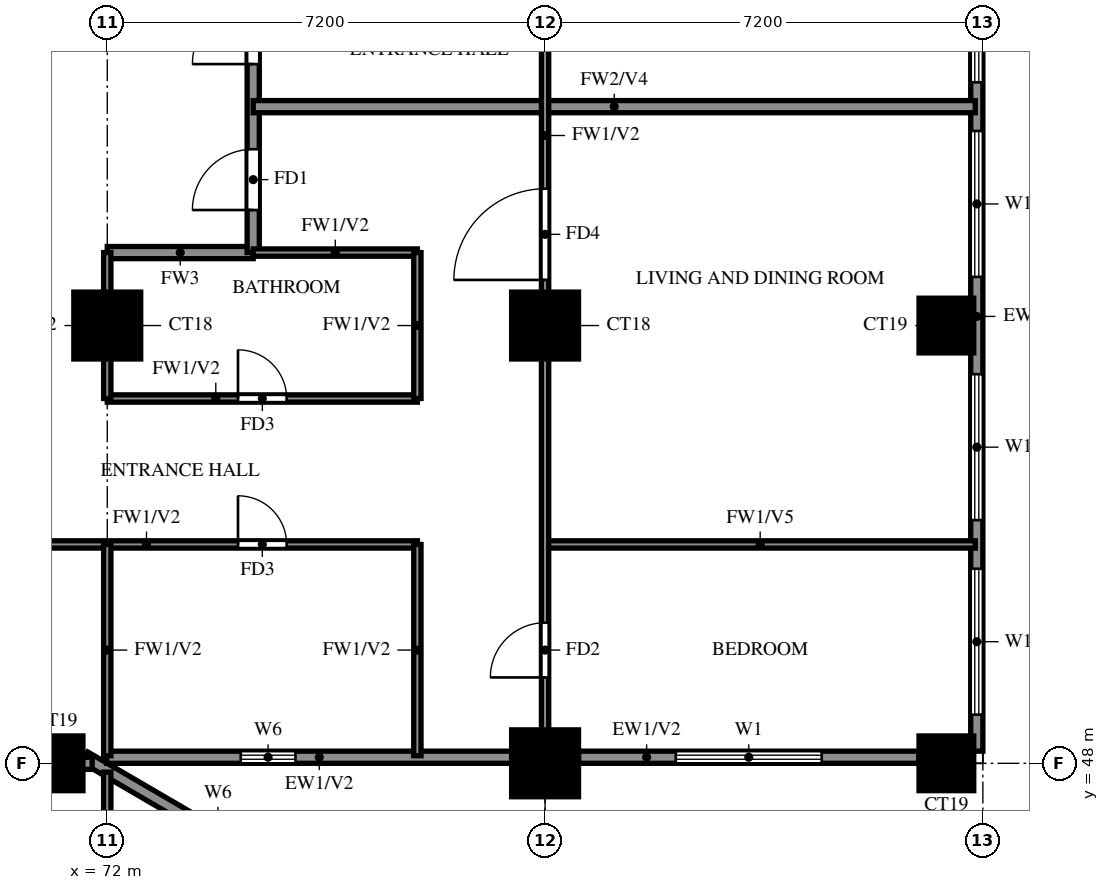
"""IFC4 building model, lengths in metres.
Left out: names, types, materials, properties, quantities, classifications, styles, units other than length and angle.
Written with IfcOpenShell. Run it as: python <this file> out.ifc"""

import sys

from ifc_helpers import new_model, si_unit, direction, frame, frame_2d, origin, origin_2d, place, context, subcontext, project, spatial, rectangle, extrude, source, transform, mapped, element, fill, save


model = new_model("IFC4")
c1 = context("Model", 3, precision=1e-05, world=origin(), true_north=direction((0.0, 1.0)))
c2 = subcontext(c1, "Body", "Model", "MODEL_VIEW")
j1 = project(units=[si_unit("LENGTHUNIT", "METRE"), si_unit("PLANEANGLEUNIT", "RADIAN")], contexts=[c1])
p1 = place(None, origin())
s1 = spatial("IfcSite", under=j1, at=p1, CompositionType="ELEMENT")
p2 = place(p1, origin())
s2 = spatial("IfcBuilding", under=s1, at=p2, CompositionType="ELEMENT")
p3 = place(p2, frame((0.0, 0.0, 113.0)))
s3 = spatial("IfcBuildingStorey", under=s2, at=p3, CompositionType="ELEMENT", Elevation=113.0)
m1 = source(origin(), c2, "Body", "SweptSolid", [
    extrude(rectangle(XDim=0.9, YDim=0.9, at=origin_2d()), origin(), (0.0, 0.0, 1.0), 3.2),
])
p4 = place(p3, frame((71.15, 48.0, 0.0), z_axis=(0.0, 0.0, 1.0), x_axis=(1.0, 0.0, 0.0)))
e1 = element("IfcColumn", 1, at=p4, inside=s3, PredefinedType="COLUMN", context=c2, shape_type="MappedRepresentation", body=[
    mapped(m1, transform((0.0, 0.0, 0.0))),
])
m2 = source(origin(), c2, "Body", "SweptSolid", [
    extrude(rectangle(XDim=1.1, YDim=1.1, at=origin_2d()), origin(), (0.0, 0.0, 1.0), 3.2),
])
p5 = place(p3, frame((79.2, 48.0, 0.0), z_axis=(0.0, 0.0, 1.0), x_axis=(1.0, 0.0, 0.0)))
e2 = element("IfcColumn", 2, at=p5, inside=s3, PredefinedType="COLUMN", context=c2, shape_type="MappedRepresentation", body=[
    mapped(m2, transform((0.0, 0.0, 0.0))),
])
p6 = place(p3, frame((85.8, 48.0, 0.0), z_axis=(0.0, 0.0, 1.0), x_axis=(1.0, 0.0, 0.0)))
e3 = element("IfcColumn", 3, at=p6, inside=s3, PredefinedType="COLUMN", context=c2, shape_type="MappedRepresentation", body=[
    mapped(m1, transform((0.0, 0.0, 0.0))),
])
for number, where, z_axis, x_axis in (
    (4, (72.0, 55.2, 0.0), (0.0, 0.0, 1.0), (1.0, 0.0, 0.0)),
    (5, (79.2, 55.2, 0.0), (0.0, 0.0, 1.0), (1.0, 0.0, 0.0)),
):
    element("IfcColumn", number, at=place(p3, frame(where, z_axis=z_axis, x_axis=x_axis)), inside=s3, PredefinedType="COLUMN", context=c2, shape_type="MappedRepresentation", body=[
        mapped(m2, transform((0.0, 0.0, 0.0))),
    ])
p7 = place(p3, frame((85.8, 55.2, 0.0), z_axis=(0.0, 0.0, 1.0), x_axis=(1.0, 0.0, 0.0)))
e6 = element("IfcColumn", 6, at=p7, inside=s3, PredefinedType="COLUMN", context=c2, shape_type="MappedRepresentation", body=[
    mapped(m1, transform((0.0, 0.0, 0.0))),
])
p8 = place(p3, frame((85.719, 39.881, 0.0), z_axis=(0.0, 0.0, 1.0), x_axis=(-0.86377618652, 0.503875678716, 0.0)))
e7 = element("IfcWall", 7, at=p8, inside=s3, PredefinedType="SOLIDWALL", context=c2, shape_type="SweptSolid", body=[
    extrude(rectangle(XDim=16.311, YDim=0.2, at=frame_2d((8.156, 0.0))), origin(), (0.0, 0.0, 1.0), 3.2),
])
p9 = place(p8, frame((13.326, 0.0, 1.5)))
e8 = element("IfcOpeningElement", 8, at=p9, cuts=e7, PredefinedType="OPENING", context=c2, shape_type="SweptSolid", body=[
    extrude(rectangle(XDim=0.9, YDim=0.9, at=frame_2d((0.45, 0.45))), frame((0.0, 0.11, 0.0), z_axis=(0.0, -1.0, 0.0), x_axis=(1.0, 0.0, 0.0)), (0.0, 0.0, 1.0), 0.22),
])
p10 = place(p3, frame((71.99, 48.1, 0.0), z_axis=(0.0, 0.0, 1.0), x_axis=(1.0, 0.0, 0.0)))
e9 = element("IfcWall", 9, at=p10, inside=s3, PredefinedType="SOLIDWALL", context=c2, shape_type="SweptSolid", body=[
    extrude(rectangle(XDim=6.66, YDim=0.2, at=frame_2d((3.33, 0.0))), origin(), (0.0, 0.0, 1.0), 3.2),
])
p11 = place(p10, frame((2.205, 0.0, 1.5)))
e10 = element("IfcOpeningElement", 10, at=p11, cuts=e9, PredefinedType="OPENING", context=c2, shape_type="SweptSolid", body=[
    extrude(rectangle(XDim=0.9, YDim=0.9, at=frame_2d((0.45, 0.45))), frame((0.0, 0.11, 0.0), z_axis=(0.0, -1.0, 0.0), x_axis=(1.0, 0.0, 0.0)), (0.0, 0.0, 1.0), 0.22),
])
p12 = place(p3, frame((79.75, 48.1, 0.0), z_axis=(0.0, 0.0, 1.0), x_axis=(1.0, 0.0, 0.0)))
e11 = element("IfcWall", 11, at=p12, inside=s3, PredefinedType="SOLIDWALL", context=c2, shape_type="SweptSolid", body=[
    extrude(rectangle(XDim=5.6, YDim=0.2, at=frame_2d((2.8, 0.0))), origin(), (0.0, 0.0, 1.0), 3.2),
])
p13 = place(p12, frame((1.6, 0.0, 0.6)))
e12 = element("IfcOpeningElement", 12, at=p13, cuts=e11, PredefinedType="OPENING", context=c2, shape_type="SweptSolid", body=[
    extrude(rectangle(XDim=2.4, YDim=2.4, at=frame_2d((1.2, 1.2))), frame((0.0, 0.11, 0.0), z_axis=(0.0, -1.0, 0.0), x_axis=(1.0, 0.0, 0.0)), (0.0, 0.0, 1.0), 0.22),
])
p14 = place(p3, frame((86.3, 48.2, 0.0), z_axis=(0.0, 0.0, 1.0), x_axis=(0.0, 1.0, 0.0)))
e13 = element("IfcWall", 13, at=p14, inside=s3, PredefinedType="SOLIDWALL", context=c2, shape_type="SweptSolid", body=[
    extrude(rectangle(XDim=28.6, YDim=0.2, at=frame_2d((14.3, 0.0))), origin(), (0.0, 0.0, 1.0), 3.2),
])
p15 = place(p14, frame((0.6, 0.0, 0.6)))
e14 = element("IfcOpeningElement", 14, at=p15, cuts=e13, PredefinedType="OPENING", context=c2, shape_type="SweptSolid", body=[
    extrude(rectangle(XDim=2.4, YDim=2.4, at=frame_2d((1.2, 1.2))), frame((0.0, 0.11, 0.0), z_axis=(0.0, -1.0, 0.0), x_axis=(1.0, 0.0, 0.0)), (0.0, 0.0, 1.0), 0.22),
])
p16 = place(p14, frame((3.8, 0.0, 0.6)))
e15 = element("IfcOpeningElement", 15, at=p16, cuts=e13, PredefinedType="OPENING", context=c2, shape_type="SweptSolid", body=[
    extrude(rectangle(XDim=2.4, YDim=2.4, at=frame_2d((1.2, 1.2))), frame((0.0, 0.11, 0.0), z_axis=(0.0, -1.0, 0.0), x_axis=(1.0, 0.0, 0.0)), (0.0, 0.0, 1.0), 0.22),
])
p17 = place(p14, frame((7.8, 0.0, 0.6)))
e16 = element("IfcOpeningElement", 16, at=p17, cuts=e13, PredefinedType="OPENING", context=c2, shape_type="SweptSolid", body=[
    extrude(rectangle(XDim=2.4, YDim=2.4, at=frame_2d((1.2, 1.2))), frame((0.0, 0.11, 0.0), z_axis=(0.0, -1.0, 0.0), x_axis=(1.0, 0.0, 0.0)), (0.0, 0.0, 1.0), 0.22),
])
p18 = place(p14, frame((11.0, 0.0, 0.6)))
e17 = element("IfcOpeningElement", 17, at=p18, cuts=e13, PredefinedType="OPENING", context=c2, shape_type="SweptSolid", body=[
    extrude(rectangle(XDim=2.4, YDim=2.4, at=frame_2d((1.2, 1.2))), frame((0.0, 0.11, 0.0), z_axis=(0.0, -1.0, 0.0), x_axis=(1.0, 0.0, 0.0)), (0.0, 0.0, 1.0), 0.22),
])
p19 = place(p14, frame((15.167, 0.0, 0.6)))
e18 = element("IfcOpeningElement", 18, at=p19, cuts=e13, PredefinedType="OPENING", context=c2, shape_type="SweptSolid", body=[
    extrude(rectangle(XDim=2.4, YDim=2.4, at=frame_2d((1.2, 1.2))), frame((0.0, 0.11, 0.0), z_axis=(0.0, -1.0, 0.0), x_axis=(1.0, 0.0, 0.0)), (0.0, 0.0, 1.0), 0.22),
])
p20 = place(p14, frame((18.033, 0.0, 0.6)))
e19 = element("IfcOpeningElement", 19, at=p20, cuts=e13, PredefinedType="OPENING", context=c2, shape_type="SweptSolid", body=[
    extrude(rectangle(XDim=2.4, YDim=2.4, at=frame_2d((1.2, 1.2))), frame((0.0, 0.11, 0.0), z_axis=(0.0, -1.0, 0.0), x_axis=(1.0, 0.0, 0.0)), (0.0, 0.0, 1.0), 0.22),
])
p21 = place(p14, frame((22.95, 0.0, 1.5)))
e20 = element("IfcOpeningElement", 20, at=p21, cuts=e13, PredefinedType="OPENING", context=c2, shape_type="SweptSolid", body=[
    extrude(rectangle(XDim=0.9, YDim=0.9, at=frame_2d((0.45, 0.45))), frame((0.0, 0.11, 0.0), z_axis=(0.0, -1.0, 0.0), x_axis=(1.0, 0.0, 0.0)), (0.0, 0.0, 1.0), 0.22),
])
p22 = place(p14, frame((25.4, 0.0, 0.6)))
e21 = element("IfcOpeningElement", 21, at=p22, cuts=e13, PredefinedType="OPENING", context=c2, shape_type="SweptSolid", body=[
    extrude(rectangle(XDim=2.4, YDim=2.4, at=frame_2d((1.2, 1.2))), frame((0.0, 0.11, 0.0), z_axis=(0.0, -1.0, 0.0), x_axis=(1.0, 0.0, 0.0)), (0.0, 0.0, 1.0), 0.22),
])
p23 = place(p3, frame((72.0, 56.4, 0.0), z_axis=(0.0, 0.0, 1.0), x_axis=(1.0, 0.0, 0.0)))
e22 = element("IfcWall", 22, at=p23, inside=s3, PredefinedType="SOLIDWALL", context=c2, shape_type="SweptSolid", body=[
    extrude(rectangle(XDim=2.4, YDim=0.2, at=frame_2d((1.2, 0.0))), origin(), (0.0, 0.0, 1.0), 3.2),
])
p24 = place(p3, frame((74.4, 56.4, 0.0), z_axis=(0.0, 0.0, 1.0), x_axis=(0.0, 1.0, 0.0)))
e23 = element("IfcWall", 23, at=p24, inside=s3, PredefinedType="SOLIDWALL", context=c2, shape_type="SweptSolid", body=[
    extrude(rectangle(XDim=9.6, YDim=0.2, at=frame_2d((4.8, 0.0))), origin(), (0.0, 0.0, 1.0), 3.2),
])
p25 = place(p24, frame((0.7, 0.0, 0.0)))
e24 = element("IfcOpeningElement", 24, at=p25, cuts=e23, PredefinedType="OPENING", context=c2, shape_type="SweptSolid", body=[
    extrude(rectangle(XDim=1.0, YDim=2.1, at=frame_2d((0.5, 1.05))), frame((0.0, 0.11, 0.0), z_axis=(0.0, -1.0, 0.0), x_axis=(1.0, 0.0, 0.0)), (0.0, 0.0, 1.0), 0.22),
])
p26 = place(p24, frame((3.1, 0.0, 0.0)))
e25 = element("IfcOpeningElement", 25, at=p26, cuts=e23, PredefinedType="OPENING", context=c2, shape_type="SweptSolid", body=[
    extrude(rectangle(XDim=1.0, YDim=2.1, at=frame_2d((0.5, 1.05))), frame((0.0, 0.11, 0.0), z_axis=(0.0, -1.0, 0.0), x_axis=(1.0, 0.0, 0.0)), (0.0, 0.0, 1.0), 0.22),
])
p27 = place(p3, frame((67.2, 48.0, 0.0), z_axis=(0.0, 0.0, 1.0), x_axis=(1.0, 0.0, 0.0)))
e26 = element("IfcWall", 26, at=p27, inside=s3, PredefinedType="SOLIDWALL", context=c2, shape_type="SweptSolid", body=[
    extrude(rectangle(XDim=4.552, YDim=0.2, at=frame_2d((2.276, 0.0))), origin(), (0.0, 0.0, 1.0), 3.2),
])
p28 = place(p3, frame((74.4, 58.8, 0.0), z_axis=(0.0, 0.0, 1.0), x_axis=(1.0, 0.0, 0.0)))
e27 = element("IfcWall", 27, at=p28, inside=s3, PredefinedType="SOLIDWALL", context=c2, shape_type="SweptSolid", body=[
    extrude(rectangle(XDim=11.875, YDim=0.2, at=frame_2d((5.938, 0.0))), origin(), (0.0, 0.0, 1.0), 2.3),
])
p29 = place(p3, frame((67.2, 51.6, 0.0), z_axis=(0.0, 0.0, 1.0), x_axis=(1.0, 0.0, 0.0)))
e28 = element("IfcWall", 28, at=p29, inside=s3, PredefinedType="PARTITIONING", context=c2, shape_type="SweptSolid", body=[
    extrude(rectangle(XDim=9.9, YDim=0.12, at=frame_2d((4.95, 0.0))), origin(), (0.0, 0.0, 1.0), 3.2),
])
p30 = place(p29, frame((6.95, 0.0, 0.0)))
e29 = element("IfcOpeningElement", 29, at=p30, cuts=e28, PredefinedType="OPENING", context=c2, shape_type="SweptSolid", body=[
    extrude(rectangle(XDim=0.8, YDim=2.1, at=frame_2d((0.4, 1.05))), frame((0.0, 0.07, 0.0), z_axis=(0.0, -1.0, 0.0), x_axis=(1.0, 0.0, 0.0)), (0.0, 0.0, 1.0), 0.14),
])
p31 = place(p29, frame((1.95, 0.0, 0.0)))
e30 = element("IfcOpeningElement", 30, at=p31, cuts=e28, PredefinedType="OPENING", context=c2, shape_type="SweptSolid", body=[
    extrude(rectangle(XDim=0.9, YDim=2.1, at=frame_2d((0.45, 1.05))), frame((0.0, 0.07, 0.0), z_axis=(0.0, -1.0, 0.0), x_axis=(1.0, 0.0, 0.0)), (0.0, 0.0, 1.0), 0.14),
])
p32 = place(p3, frame((79.2, 51.6, 0.0), z_axis=(0.0, 0.0, 1.0), x_axis=(1.0, 0.0, 0.0)))
e31 = element("IfcWall", 31, at=p32, inside=s3, PredefinedType="PARTITIONING", context=c2, shape_type="SweptSolid", body=[
    extrude(rectangle(XDim=7.075, YDim=0.12, at=frame_2d((3.538, 0.0))), origin(), (0.0, 0.0, 1.0), 2.3),
])
p33 = place(p3, frame((72.0, 54.0, 0.0), z_axis=(0.0, 0.0, 1.0), x_axis=(1.0, 0.0, 0.0)))
e32 = element("IfcWall", 32, at=p33, inside=s3, PredefinedType="PARTITIONING", context=c2, shape_type="SweptSolid", body=[
    extrude(rectangle(XDim=5.1, YDim=0.12, at=frame_2d((2.55, 0.0))), origin(), (0.0, 0.0, 1.0), 3.2),
])
p34 = place(p33, frame((2.15, 0.0, 0.0)))
e33 = element("IfcOpeningElement", 33, at=p34, cuts=e32, PredefinedType="OPENING", context=c2, shape_type="SweptSolid", body=[
    extrude(rectangle(XDim=0.8, YDim=2.1, at=frame_2d((0.4, 1.05))), frame((0.0, 0.07, 0.0), z_axis=(0.0, -1.0, 0.0), x_axis=(1.0, 0.0, 0.0)), (0.0, 0.0, 1.0), 0.14),
])
p35 = place(p3, frame((74.4, 56.4, 0.0), z_axis=(0.0, 0.0, 1.0), x_axis=(1.0, 0.0, 0.0)))
e34 = element("IfcWall", 34, at=p35, inside=s3, PredefinedType="PARTITIONING", context=c2, shape_type="SweptSolid", body=[
    extrude(rectangle(XDim=2.7, YDim=0.12, at=frame_2d((1.35, 0.0))), origin(), (0.0, 0.0, 1.0), 3.2),
])
p36 = place(p3, frame((72.0, 39.725, 0.0), z_axis=(0.0, 0.0, 1.0), x_axis=(0.0, 1.0, 0.0)))
e35 = element("IfcWall", 35, at=p36, inside=s3, PredefinedType="PARTITIONING", context=c2, shape_type="SweptSolid", body=[
    extrude(rectangle(XDim=8.13, YDim=0.12, at=frame_2d((4.065, 0.0))), origin(), (0.0, 0.0, 1.0), 2.3),
])
p37 = place(p36, frame((1.788, 0.0, 0.0)))
e36 = element("IfcOpeningElement", 36, at=p37, cuts=e35, PredefinedType="OPENING", context=c2, shape_type="SweptSolid", body=[
    extrude(rectangle(XDim=0.9, YDim=2.1, at=frame_2d((0.45, 1.05))), frame((0.0, 0.07, 0.0), z_axis=(0.0, -1.0, 0.0), x_axis=(1.0, 0.0, 0.0)), (0.0, 0.0, 1.0), 0.14),
])
p38 = place(p36, frame((4.575, 0.0, 0.0)))
e37 = element("IfcOpeningElement", 37, at=p38, cuts=e35, PredefinedType="OPENING", context=c2, shape_type="SweptSolid", body=[
    extrude(rectangle(XDim=0.8, YDim=2.1, at=frame_2d((0.4, 1.05))), frame((0.0, 0.07, 0.0), z_axis=(0.0, -1.0, 0.0), x_axis=(1.0, 0.0, 0.0)), (0.0, 0.0, 1.0), 0.14),
])
p39 = place(p3, frame((72.0, 48.125, 0.0), z_axis=(0.0, 0.0, 1.0), x_axis=(0.0, 1.0, 0.0)))
e38 = element("IfcWall", 38, at=p39, inside=s3, PredefinedType="PARTITIONING", context=c2, shape_type="SweptSolid", body=[
    extrude(rectangle(XDim=3.475, YDim=0.12, at=frame_2d((1.738, 0.0))), origin(), (0.0, 0.0, 1.0), 3.2),
])
p40 = place(p3, frame((72.0, 54.0, 0.0), z_axis=(0.0, 0.0, 1.0), x_axis=(0.0, 1.0, 0.0)))
e39 = element("IfcWall", 39, at=p40, inside=s3, PredefinedType="PARTITIONING", context=c2, shape_type="SweptSolid", body=[
    extrude(rectangle(XDim=2.4, YDim=0.12, at=frame_2d((1.2, 0.0))), origin(), (0.0, 0.0, 1.0), 3.2),
])
p41 = place(p3, frame((77.1, 48.125, 0.0), z_axis=(0.0, 0.0, 1.0), x_axis=(0.0, 1.0, 0.0)))
e40 = element("IfcWall", 40, at=p41, inside=s3, PredefinedType="PARTITIONING", context=c2, shape_type="SweptSolid", body=[
    extrude(rectangle(XDim=3.475, YDim=0.12, at=frame_2d((1.738, 0.0))), origin(), (0.0, 0.0, 1.0), 3.2),
])
p42 = place(p3, frame((77.1, 54.0, 0.0), z_axis=(0.0, 0.0, 1.0), x_axis=(0.0, 1.0, 0.0)))
e41 = element("IfcWall", 41, at=p42, inside=s3, PredefinedType="PARTITIONING", context=c2, shape_type="SweptSolid", body=[
    extrude(rectangle(XDim=2.4, YDim=0.12, at=frame_2d((1.2, 0.0))), origin(), (0.0, 0.0, 1.0), 3.2),
])
p43 = place(p3, frame((79.2, 48.125, 0.0), z_axis=(0.0, 0.0, 1.0), x_axis=(0.0, 1.0, 0.0)))
e42 = element("IfcWall", 42, at=p43, inside=s3, PredefinedType="PARTITIONING", context=c2, shape_type="SweptSolid", body=[
    extrude(rectangle(XDim=21.475, YDim=0.12, at=frame_2d((10.738, 0.0))), origin(), (0.0, 0.0, 1.0), 3.2),
])
p44 = place(p43, frame((1.288, 0.0, 0.0)))
e43 = element("IfcOpeningElement", 43, at=p44, cuts=e42, PredefinedType="OPENING", context=c2, shape_type="SweptSolid", body=[
    extrude(rectangle(XDim=0.9, YDim=2.1, at=frame_2d((0.45, 1.05))), frame((0.0, 0.07, 0.0), z_axis=(0.0, -1.0, 0.0), x_axis=(1.0, 0.0, 0.0)), (0.0, 0.0, 1.0), 0.14),
])
p45 = place(p43, frame((7.825, 0.0, 0.0)))
e44 = element("IfcOpeningElement", 44, at=p45, cuts=e42, PredefinedType="OPENING", context=c2, shape_type="SweptSolid", body=[
    extrude(rectangle(XDim=1.5, YDim=2.1, at=frame_2d((0.75, 1.05))), frame((0.0, 0.07, 0.0), z_axis=(0.0, -1.0, 0.0), x_axis=(1.0, 0.0, 0.0)), (0.0, 0.0, 1.0), 0.14),
])
p46 = place(p43, frame((12.025, 0.0, 0.0)))
e45 = element("IfcOpeningElement", 45, at=p46, cuts=e42, PredefinedType="OPENING", context=c2, shape_type="SweptSolid", body=[
    extrude(rectangle(XDim=0.9, YDim=2.1, at=frame_2d((0.45, 1.05))), frame((0.0, 0.07, 0.0), z_axis=(0.0, -1.0, 0.0), x_axis=(1.0, 0.0, 0.0)), (0.0, 0.0, 1.0), 0.14),
])
p47 = place(p43, frame((17.425, 0.0, 0.0)))
e46 = element("IfcOpeningElement", 46, at=p47, cuts=e42, PredefinedType="OPENING", context=c2, shape_type="SweptSolid", body=[
    extrude(rectangle(XDim=0.9, YDim=2.1, at=frame_2d((0.45, 1.05))), frame((0.0, 0.07, 0.0), z_axis=(0.0, -1.0, 0.0), x_axis=(1.0, 0.0, 0.0)), (0.0, 0.0, 1.0), 0.14),
])
p48 = place(p11, origin())
e47 = element("IfcWindow", 47, at=p48, inside=s3, PartitioningType="SINGLE_PANEL", PredefinedType="WINDOW", context=c2, shape_type="SweptSolid", body=[
    extrude(rectangle(XDim=0.9, YDim=0.9, at=frame_2d((0.45, 0.45))), frame((0.0, 0.03, 0.0), z_axis=(0.0, -1.0, 0.0), x_axis=(1.0, 0.0, 0.0)), (0.0, 0.0, 1.0), 0.06),
])
fill(e10, e47)
p49 = place(p13, origin())
e48 = element("IfcWindow", 48, at=p49, inside=s3, PartitioningType="DOUBLE_PANEL_VERTICAL", PredefinedType="WINDOW", context=c2, shape_type="SweptSolid", body=[
    extrude(rectangle(XDim=2.4, YDim=2.4, at=frame_2d((1.2, 1.2))), frame((0.0, 0.03, 0.0), z_axis=(0.0, -1.0, 0.0), x_axis=(1.0, 0.0, 0.0)), (0.0, 0.0, 1.0), 0.06),
])
fill(e12, e48)
p50 = place(p15, origin())
e49 = element("IfcWindow", 49, at=p50, inside=s3, PartitioningType="DOUBLE_PANEL_VERTICAL", PredefinedType="WINDOW", context=c2, shape_type="SweptSolid", body=[
    extrude(rectangle(XDim=2.4, YDim=2.4, at=frame_2d((1.2, 1.2))), frame((0.0, 0.03, 0.0), z_axis=(0.0, -1.0, 0.0), x_axis=(1.0, 0.0, 0.0)), (0.0, 0.0, 1.0), 0.06),
])
fill(e14, e49)
p51 = place(p16, origin())
e50 = element("IfcWindow", 50, at=p51, inside=s3, PartitioningType="DOUBLE_PANEL_VERTICAL", PredefinedType="WINDOW", context=c2, shape_type="SweptSolid", body=[
    extrude(rectangle(XDim=2.4, YDim=2.4, at=frame_2d((1.2, 1.2))), frame((0.0, 0.03, 0.0), z_axis=(0.0, -1.0, 0.0), x_axis=(1.0, 0.0, 0.0)), (0.0, 0.0, 1.0), 0.06),
])
fill(e15, e50)
p52 = place(p17, origin())
e51 = element("IfcWindow", 51, at=p52, inside=s3, PartitioningType="DOUBLE_PANEL_VERTICAL", PredefinedType="WINDOW", context=c2, shape_type="SweptSolid", body=[
    extrude(rectangle(XDim=2.4, YDim=2.4, at=frame_2d((1.2, 1.2))), frame((0.0, 0.03, 0.0), z_axis=(0.0, -1.0, 0.0), x_axis=(1.0, 0.0, 0.0)), (0.0, 0.0, 1.0), 0.06),
])
fill(e16, e51)
p53 = place(p18, origin())
e52 = element("IfcWindow", 52, at=p53, inside=s3, PartitioningType="DOUBLE_PANEL_VERTICAL", PredefinedType="WINDOW", context=c2, shape_type="SweptSolid", body=[
    extrude(rectangle(XDim=2.4, YDim=2.4, at=frame_2d((1.2, 1.2))), frame((0.0, 0.03, 0.0), z_axis=(0.0, -1.0, 0.0), x_axis=(1.0, 0.0, 0.0)), (0.0, 0.0, 1.0), 0.06),
])
fill(e17, e52)
p54 = place(p25, origin())
e53 = element("IfcDoor", 53, at=p54, inside=s3, OperationType="SINGLE_SWING_LEFT", PredefinedType="DOOR", context=c2, shape_type="SweptSolid", body=[
    extrude(rectangle(XDim=1.0, YDim=2.1, at=frame_2d((0.5, 1.05))), frame((0.0, 0.025, 0.0), z_axis=(0.0, -1.0, 0.0), x_axis=(1.0, 0.0, 0.0)), (0.0, 0.0, 1.0), 0.05),
])
fill(e24, e53)
p55 = place(p44, origin())
e54 = element("IfcDoor", 54, at=p55, inside=s3, OperationType="SINGLE_SWING_RIGHT", PredefinedType="DOOR", context=c2, shape_type="SweptSolid", body=[
    extrude(rectangle(XDim=0.9, YDim=2.1, at=frame_2d((0.45, 1.05))), frame((0.0, 0.025, 0.0), z_axis=(0.0, -1.0, 0.0), x_axis=(1.0, 0.0, 0.0)), (0.0, 0.0, 1.0), 0.05),
])
fill(e43, e54)
p56 = place(p45, origin())
e55 = element("IfcDoor", 55, at=p56, inside=s3, OperationType="SINGLE_SWING_RIGHT", PredefinedType="DOOR", context=c2, shape_type="SweptSolid", body=[
    extrude(rectangle(XDim=1.5, YDim=2.1, at=frame_2d((0.75, 1.05))), frame((0.0, 0.025, 0.0), z_axis=(0.0, -1.0, 0.0), x_axis=(1.0, 0.0, 0.0)), (0.0, 0.0, 1.0), 0.05),
])
fill(e44, e55)
p57 = place(p30, origin())
e56 = element("IfcDoor", 56, at=p57, inside=s3, OperationType="SINGLE_SWING_LEFT", PredefinedType="DOOR", context=c2, shape_type="SweptSolid", body=[
    extrude(rectangle(XDim=0.8, YDim=2.1, at=frame_2d((0.4, 1.05))), frame((0.0, 0.025, 0.0), z_axis=(0.0, -1.0, 0.0), x_axis=(1.0, 0.0, 0.0)), (0.0, 0.0, 1.0), 0.05),
])
fill(e29, e56)
p58 = place(p34, origin())
e57 = element("IfcDoor", 57, at=p58, inside=s3, OperationType="SINGLE_SWING_RIGHT", PredefinedType="DOOR", context=c2, shape_type="SweptSolid", body=[
    extrude(rectangle(XDim=0.8, YDim=2.1, at=frame_2d((0.4, 1.05))), frame((0.0, 0.025, 0.0), z_axis=(0.0, -1.0, 0.0), x_axis=(1.0, 0.0, 0.0)), (0.0, 0.0, 1.0), 0.05),
])
fill(e33, e57)
p59 = place(p26, origin())
e58 = element("IfcDoor", 58, at=p59, inside=s3, OperationType="SINGLE_SWING_RIGHT", PredefinedType="DOOR", context=c2, shape_type="SweptSolid", body=[
    extrude(rectangle(XDim=1.0, YDim=2.1, at=frame_2d((0.5, 1.05))), frame((0.0, 0.025, 0.0), z_axis=(0.0, -1.0, 0.0), x_axis=(1.0, 0.0, 0.0)), (0.0, 0.0, 1.0), 0.05),
])
fill(e25, e58)
save(model, sys.argv[1])
